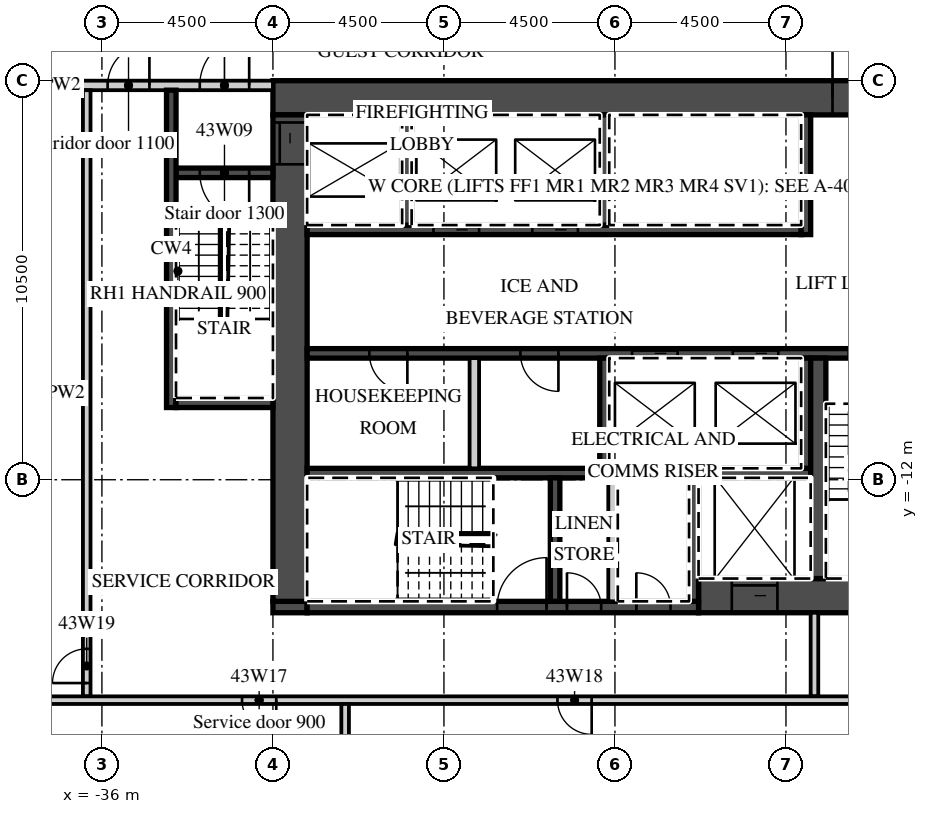
"""IFC4 building model, lengths in metres.
Left out: names, types, materials, properties, quantities, classifications, styles, units other than length and angle.
Written with IfcOpenShell. Run it as: python <this file> out.ifc"""

import sys

from ifc_helpers import new_model, si_unit, direction, frame, frame_2d, origin, place, context, subcontext, project, spatial, rectangle, extrude, element, fill, save


model = new_model("IFC4")
c1 = context("Model", 3, precision=1e-05, world=origin(), true_north=direction((0.0, 1.0)))
c2 = subcontext(c1, "Body", "Model", "MODEL_VIEW")
j1 = project(units=[si_unit("LENGTHUNIT", "METRE"), si_unit("PLANEANGLEUNIT", "RADIAN")], contexts=[c1])
p1 = place(None, origin())
s1 = spatial("IfcSite", under=j1, at=p1, CompositionType="ELEMENT")
p2 = place(p1, origin())
s2 = spatial("IfcBuilding", under=s1, at=p2, CompositionType="ELEMENT")
p3 = place(p2, frame((0.0, 0.0, 183.4)))
s3 = spatial("IfcBuildingStorey", under=s2, at=p3, CompositionType="ELEMENT", Elevation=183.4)
p4 = place(p3, frame((-31.5, -1.95, 0.0), z_axis=(0.0, 0.0, 1.0), x_axis=(1.0, 0.0, 0.0)))
e1 = element("IfcWall", 1, at=p4, inside=s3, PredefinedType="SHEAR", context=c2, shape_type="SweptSolid", body=[
    extrude(rectangle(XDim=18.0, YDim=0.9, at=frame_2d((9.0, 0.0))), origin(), (0.0, 0.0, 1.0), 3.02),
])
p5 = place(p4, frame((14.725, 0.0, 0.0)))
e2 = element("IfcOpeningElement", 2, at=p5, cuts=e1, PredefinedType="OPENING", context=c2, shape_type="SweptSolid", body=[
    extrude(rectangle(XDim=1.8, YDim=2.1, at=frame_2d((0.9, 1.05))), frame((0.0, 0.46, 0.0), z_axis=(0.0, -1.0, 0.0), x_axis=(1.0, 0.0, 0.0)), (0.0, 0.0, 1.0), 0.92),
])
p6 = place(p3, frame((-20.3, -15.05, 0.0), z_axis=(0.0, 0.0, 1.0), x_axis=(1.0, 0.0, 0.0)))
e3 = element("IfcWall", 3, at=p6, inside=s3, PredefinedType="SHEAR", context=c2, shape_type="SweptSolid", body=[
    extrude(rectangle(XDim=6.8, YDim=0.9, at=frame_2d((3.4, 0.0))), origin(), (0.0, 0.0, 1.0), 3.02),
])
p7 = place(p6, frame((0.875, 0.0, 0.0)))
e4 = element("IfcOpeningElement", 4, at=p7, cuts=e3, PredefinedType="OPENING", context=c2, shape_type="SweptSolid", body=[
    extrude(rectangle(XDim=1.2, YDim=2.1, at=frame_2d((0.6, 1.05))), frame((0.0, 0.46, 0.0), z_axis=(0.0, -1.0, 0.0), x_axis=(1.0, 0.0, 0.0)), (0.0, 0.0, 1.0), 0.92),
])
p8 = place(p3, frame((-31.5, -15.35, 0.0), z_axis=(0.0, 0.0, 1.0), x_axis=(1.0, 0.0, 0.0)))
e5 = element("IfcWall", 5, at=p8, inside=s3, PredefinedType="SHEAR", context=c2, shape_type="SweptSolid", body=[
    extrude(rectangle(XDim=0.9, YDim=0.3, at=frame_2d((0.45, 0.0))), origin(), (0.0, 0.0, 1.0), 3.02),
])
p9 = place(p3, frame((-30.6, -15.35, 0.0), z_axis=(0.0, 0.0, 1.0), x_axis=(1.0, 0.0, 0.0)))
e6 = element("IfcWall", 6, at=p9, inside=s3, PredefinedType="SHEAR", context=c2, shape_type="SweptSolid", body=[
    extrude(rectangle(XDim=10.3, YDim=0.3, at=frame_2d((5.15, 0.0))), origin(), (0.0, 0.0, 1.0), 3.02),
])
p10 = place(p9, frame((5.0, 0.0, 0.0)))
e7 = element("IfcOpeningElement", 7, at=p10, cuts=e6, PredefinedType="OPENING", context=c2, shape_type="SweptSolid", body=[
    extrude(rectangle(XDim=1.3, YDim=2.1, at=frame_2d((0.65, 1.05))), frame((0.0, 0.16, 0.0), z_axis=(0.0, -1.0, 0.0), x_axis=(1.0, 0.0, 0.0)), (0.0, 0.0, 1.0), 0.32),
])
p11 = place(p9, frame((6.837, 0.0, 0.0)))
e8 = element("IfcOpeningElement", 8, at=p11, cuts=e6, PredefinedType="OPENING", context=c2, shape_type="SweptSolid", body=[
    extrude(rectangle(XDim=0.9, YDim=2.1, at=frame_2d((0.45, 1.05))), frame((0.0, 0.16, 0.0), z_axis=(0.0, -1.0, 0.0), x_axis=(1.0, 0.0, 0.0)), (0.0, 0.0, 1.0), 0.32),
])
p12 = place(p9, frame((8.663, 0.0, 0.0)))
e9 = element("IfcOpeningElement", 9, at=p12, cuts=e6, PredefinedType="OPENING", context=c2, shape_type="SweptSolid", body=[
    extrude(rectangle(XDim=0.9, YDim=2.1, at=frame_2d((0.45, 1.05))), frame((0.0, 0.16, 0.0), z_axis=(0.0, -1.0, 0.0), x_axis=(1.0, 0.0, 0.0)), (0.0, 0.0, 1.0), 0.32),
])
p13 = place(p3, frame((-31.05, -15.2, 0.0), z_axis=(0.0, 0.0, 1.0), x_axis=(0.0, 1.0, 0.0)))
e10 = element("IfcWall", 10, at=p13, inside=s3, PredefinedType="SHEAR", context=c2, shape_type="SweptSolid", body=[
    extrude(rectangle(XDim=12.8, YDim=0.9, at=frame_2d((6.4, 0.0))), origin(), (0.0, 0.0, 1.0), 3.02),
])
p14 = place(p13, frame((11.5, 0.0, 0.0)))
e11 = element("IfcOpeningElement", 11, at=p14, cuts=e10, PredefinedType="OPENING", context=c2, shape_type="SweptSolid", body=[
    extrude(rectangle(XDim=1.1, YDim=2.1, at=frame_2d((0.55, 1.05))), frame((0.0, 0.46, 0.0), z_axis=(0.0, -1.0, 0.0), x_axis=(1.0, 0.0, 0.0)), (0.0, 0.0, 1.0), 0.92),
])
p15 = place(p3, frame((-30.6, -5.425, 0.0), z_axis=(0.0, 0.0, 1.0), x_axis=(1.0, 0.0, 0.0)))
e12 = element("IfcWall", 12, at=p15, inside=s3, PredefinedType="SHEAR", context=c2, shape_type="SweptSolid", body=[
    extrude(rectangle(XDim=13.0, YDim=0.25, at=frame_2d((6.5, 0.0))), origin(), (0.0, 0.0, 1.0), 3.02),
])
p16 = place(p15, frame((3.325, 0.0, 0.0)))
e13 = element("IfcOpeningElement", 13, at=p16, cuts=e12, PredefinedType="OPENING", context=c2, shape_type="SweptSolid", body=[
    extrude(rectangle(XDim=1.2, YDim=2.1, at=frame_2d((0.6, 1.05))), frame((0.0, 0.135, 0.0), z_axis=(0.0, -1.0, 0.0), x_axis=(1.0, 0.0, 0.0)), (0.0, 0.0, 1.0), 0.27),
])
p17 = place(p15, frame((5.925, 0.0, 0.0)))
e14 = element("IfcOpeningElement", 14, at=p17, cuts=e12, PredefinedType="OPENING", context=c2, shape_type="SweptSolid", body=[
    extrude(rectangle(XDim=1.2, YDim=2.1, at=frame_2d((0.6, 1.05))), frame((0.0, 0.135, 0.0), z_axis=(0.0, -1.0, 0.0), x_axis=(1.0, 0.0, 0.0)), (0.0, 0.0, 1.0), 0.27),
])
p18 = place(p3, frame((-17.475, -5.55, 0.0), z_axis=(0.0, 0.0, 1.0), x_axis=(0.0, 1.0, 0.0)))
e15 = element("IfcWall", 15, at=p18, inside=s3, PredefinedType="SHEAR", context=c2, shape_type="SweptSolid", body=[
    extrude(rectangle(XDim=3.15, YDim=0.25, at=frame_2d((1.575, 0.0))), origin(), (0.0, 0.0, 1.0), 3.02),
])
for number, where, z_axis, x_axis in (
    (16, (-27.975, -5.3, 0.0), (0.0, 0.0, 1.0), (0.0, 1.0, 0.0)),
    (17, (-22.775, -5.3, 0.0), (0.0, 0.0, 1.0), (0.0, 1.0, 0.0)),
):
    element("IfcWall", number, at=place(p3, frame(where, z_axis=z_axis, x_axis=x_axis)), inside=s3, PredefinedType="SHEAR", context=c2, shape_type="SweptSolid", body=[
        extrude(rectangle(XDim=2.9, YDim=0.25, at=frame_2d((1.45, 0.0))), origin(), (0.0, 0.0, 1.0), 3.02),
    ])
p19 = place(p3, frame((-30.6, -8.675, 0.0), z_axis=(0.0, 0.0, 1.0), x_axis=(1.0, 0.0, 0.0)))
e18 = element("IfcWall", 18, at=p19, inside=s3, PredefinedType="SHEAR", context=c2, shape_type="SweptSolid", body=[
    extrude(rectangle(XDim=16.2, YDim=0.25, at=frame_2d((8.1, 0.0))), origin(), (0.0, 0.0, 1.0), 3.02),
])
p20 = place(p19, frame((8.55, 0.0, 0.0)))
e19 = element("IfcOpeningElement", 19, at=p20, cuts=e18, PredefinedType="OPENING", context=c2, shape_type="SweptSolid", body=[
    extrude(rectangle(XDim=1.2, YDim=2.1, at=frame_2d((0.6, 1.05))), frame((0.0, 0.135, 0.0), z_axis=(0.0, -1.0, 0.0), x_axis=(1.0, 0.0, 0.0)), (0.0, 0.0, 1.0), 0.27),
])
p21 = place(p19, frame((11.2, 0.0, 0.0)))
e20 = element("IfcOpeningElement", 20, at=p21, cuts=e18, PredefinedType="OPENING", context=c2, shape_type="SweptSolid", body=[
    extrude(rectangle(XDim=1.2, YDim=2.1, at=frame_2d((0.6, 1.05))), frame((0.0, 0.135, 0.0), z_axis=(0.0, -1.0, 0.0), x_axis=(1.0, 0.0, 0.0)), (0.0, 0.0, 1.0), 0.27),
])
p22 = place(p19, frame((14.25, 0.0, 0.0)))
e21 = element("IfcOpeningElement", 21, at=p22, cuts=e18, PredefinedType="OPENING", context=c2, shape_type="SweptSolid", body=[
    extrude(rectangle(XDim=1.3, YDim=2.1, at=frame_2d((0.65, 1.05))), frame((0.0, 0.135, 0.0), z_axis=(0.0, -1.0, 0.0), x_axis=(1.0, 0.0, 0.0)), (0.0, 0.0, 1.0), 0.27),
])
p23 = place(p19, frame((1.637, 0.0, 0.0)))
e22 = element("IfcOpeningElement", 22, at=p23, cuts=e18, PredefinedType="OPENING", context=c2, shape_type="SweptSolid", body=[
    extrude(rectangle(XDim=1.0, YDim=2.1, at=frame_2d((0.5, 1.05))), frame((0.0, 0.135, 0.0), z_axis=(0.0, -1.0, 0.0), x_axis=(1.0, 0.0, 0.0)), (0.0, 0.0, 1.0), 0.27),
])
p24 = place(p19, frame((5.613, 0.0, 0.0)))
e23 = element("IfcOpeningElement", 23, at=p24, cuts=e18, PredefinedType="OPENING", context=c2, shape_type="SweptSolid", body=[
    extrude(rectangle(XDim=1.0, YDim=2.1, at=frame_2d((0.5, 1.05))), frame((0.0, 0.135, 0.0), z_axis=(0.0, -1.0, 0.0), x_axis=(1.0, 0.0, 0.0)), (0.0, 0.0, 1.0), 0.27),
])
p25 = place(p3, frame((-30.6, -11.825, 0.0), z_axis=(0.0, 0.0, 1.0), x_axis=(1.0, 0.0, 0.0)))
e24 = element("IfcWall", 24, at=p25, inside=s3, PredefinedType="SHEAR", context=c2, shape_type="SweptSolid", body=[
    extrude(rectangle(XDim=13.25, YDim=0.25, at=frame_2d((6.625, 0.0))), origin(), (0.0, 0.0, 1.0), 3.02),
])
for number, where, z_axis, x_axis in (
    (25, (-17.475, -11.7, 0.0), (0.0, 0.0, 1.0), (0.0, 1.0, 0.0)),
    (26, (-22.775, -11.7, 0.0), (0.0, 0.0, 1.0), (0.0, 1.0, 0.0)),
):
    element("IfcWall", number, at=place(p3, frame(where, z_axis=z_axis, x_axis=x_axis)), inside=s3, PredefinedType="SHEAR", context=c2, shape_type="SweptSolid", body=[
        extrude(rectangle(XDim=2.9, YDim=0.25, at=frame_2d((1.45, 0.0))), origin(), (0.0, 0.0, 1.0), 3.02),
    ])
p26 = place(p3, frame((-26.2, -11.7, 0.0), z_axis=(0.0, 0.0, 1.0), x_axis=(0.0, 1.0, 0.0)))
e27 = element("IfcWall", 27, at=p26, inside=s3, PredefinedType="PARTITIONING", context=c2, shape_type="SweptSolid", body=[
    extrude(rectangle(XDim=2.9, YDim=0.25, at=frame_2d((1.45, 0.0))), origin(), (0.0, 0.0, 1.0), 3.02),
])
p27 = place(p3, frame((-17.15, -14.6, 0.0), z_axis=(0.0, 0.0, 1.0), x_axis=(0.0, 1.0, 0.0)))
e28 = element("IfcWall", 28, at=p27, inside=s3, PredefinedType="SHEAR", context=c2, shape_type="SweptSolid", body=[
    extrude(rectangle(XDim=5.8, YDim=0.4, at=frame_2d((2.9, 0.0))), origin(), (0.0, 0.0, 1.0), 3.02),
])
for number, where, z_axis, x_axis in (
    (29, (-20.425, -15.2, 0.0), (0.0, 0.0, 1.0), (0.0, 1.0, 0.0)),
    (30, (-24.075, -15.2, 0.0), (0.0, 0.0, 1.0), (0.0, 1.0, 0.0)),
):
    element("IfcWall", number, at=place(p3, frame(where, z_axis=z_axis, x_axis=x_axis)), inside=s3, PredefinedType="SHEAR", context=c2, shape_type="SweptSolid", body=[
        extrude(rectangle(XDim=3.25, YDim=0.25, at=frame_2d((1.625, 0.0))), origin(), (0.0, 0.0, 1.0), 3.02),
    ])
p28 = place(p3, frame((-22.55, -15.2, 0.0), z_axis=(0.0, 0.0, 1.0), x_axis=(0.0, 1.0, 0.0)))
e31 = element("IfcWall", 31, at=p28, inside=s3, PredefinedType="PARTITIONING", context=c2, shape_type="SweptSolid", body=[
    extrude(rectangle(XDim=3.25, YDim=0.25, at=frame_2d((1.625, 0.0))), origin(), (0.0, 0.0, 1.0), 3.02),
])
p29 = place(p3, frame((-42.632, -1.625, 0.0), z_axis=(0.0, 0.0, 1.0), x_axis=(1.0, 0.0, 0.0)))
e32 = element("IfcWall", 32, at=p29, inside=s3, PredefinedType="PARTITIONING", context=c2, shape_type="SweptSolid", body=[
    extrude(rectangle(XDim=11.132, YDim=0.25, at=frame_2d((5.566, 0.0))), origin(), (0.0, 0.0, 1.0), 3.02),
])
p30 = place(p29, frame((9.207, 0.0, 0.0)))
e33 = element("IfcOpeningElement", 33, at=p30, cuts=e32, PredefinedType="OPENING", context=c2, shape_type="SweptSolid", body=[
    extrude(rectangle(XDim=1.3, YDim=2.1, at=frame_2d((0.65, 1.05))), frame((0.0, 0.135, 0.0), z_axis=(0.0, -1.0, 0.0), x_axis=(1.0, 0.0, 0.0)), (0.0, 0.0, 1.0), 0.27),
])
p31 = place(p29, frame((6.781, 0.0, 0.0)))
e34 = element("IfcOpeningElement", 34, at=p31, cuts=e32, PredefinedType="OPENING", context=c2, shape_type="SweptSolid", body=[
    extrude(rectangle(XDim=1.1, YDim=2.1, at=frame_2d((0.55, 1.05))), frame((0.0, 0.135, 0.0), z_axis=(0.0, -1.0, 0.0), x_axis=(1.0, 0.0, 0.0)), (0.0, 0.0, 1.0), 0.27),
])
p32 = place(p3, frame((-34.05, -3.925, 0.0), z_axis=(0.0, 0.0, 1.0), x_axis=(1.0, 0.0, 0.0)))
e35 = element("IfcWall", 35, at=p32, inside=s3, PredefinedType="SHEAR", context=c2, shape_type="SweptSolid", body=[
    extrude(rectangle(XDim=2.55, YDim=0.25, at=frame_2d((1.275, 0.0))), origin(), (0.0, 0.0, 1.0), 3.02),
])
p33 = place(p32, frame((0.625, 0.0, 0.0)))
e36 = element("IfcOpeningElement", 36, at=p33, cuts=e35, PredefinedType="OPENING", context=c2, shape_type="SweptSolid", body=[
    extrude(rectangle(XDim=1.3, YDim=2.1, at=frame_2d((0.65, 1.05))), frame((0.0, 0.135, 0.0), z_axis=(0.0, -1.0, 0.0), x_axis=(1.0, 0.0, 0.0)), (0.0, 0.0, 1.0), 0.27),
])
p34 = place(p3, frame((-34.175, -10.1, 0.0), z_axis=(0.0, 0.0, 1.0), x_axis=(0.0, 1.0, 0.0)))
e37 = element("IfcWall", 37, at=p34, inside=s3, PredefinedType="SHEAR", context=c2, shape_type="SweptSolid", body=[
    extrude(rectangle(XDim=8.35, YDim=0.25, at=frame_2d((4.175, 0.0))), origin(), (0.0, 0.0, 1.0), 3.02),
])
p35 = place(p3, frame((-34.05, -9.975, 0.0), z_axis=(0.0, 0.0, 1.0), x_axis=(1.0, 0.0, 0.0)))
e38 = element("IfcWall", 38, at=p35, inside=s3, PredefinedType="SHEAR", context=c2, shape_type="SweptSolid", body=[
    extrude(rectangle(XDim=2.55, YDim=0.25, at=frame_2d((1.275, 0.0))), origin(), (0.0, 0.0, 1.0), 3.02),
])
p36 = place(p3, frame((-17.25, -17.7, 0.0), z_axis=(0.0, 0.0, 1.0), x_axis=(0.0, 1.0, 0.0)))
e39 = element("IfcWall", 39, at=p36, inside=s3, PredefinedType="PARTITIONING", context=c2, shape_type="SweptSolid", body=[
    extrude(rectangle(XDim=2.2, YDim=0.2, at=frame_2d((1.1, 0.0))), origin(), (0.0, 0.0, 1.0), 3.02),
])
p37 = place(p3, frame((-36.4, -17.7, 0.0), z_axis=(0.0, 0.0, 1.0), x_axis=(0.0, 1.0, 0.0)))
e40 = element("IfcWall", 40, at=p37, inside=s3, PredefinedType="PARTITIONING", context=c2, shape_type="SweptSolid", body=[
    extrude(rectangle(XDim=15.95, YDim=0.2, at=frame_2d((7.975, 0.0))), origin(), (0.0, 0.0, 1.0), 3.02),
])
p38 = place(p37, frame((0.35, 0.0, 0.0)))
e41 = element("IfcOpeningElement", 41, at=p38, cuts=e40, PredefinedType="OPENING", context=c2, shape_type="SweptSolid", body=[
    extrude(rectangle(XDim=0.9, YDim=2.1, at=frame_2d((0.45, 1.05))), frame((0.0, 0.11, 0.0), z_axis=(0.0, -1.0, 0.0), x_axis=(1.0, 0.0, 0.0)), (0.0, 0.0, 1.0), 0.22),
])
p39 = place(p3, frame((-41.074, -17.8, 0.0), z_axis=(0.0, 0.0, 1.0), x_axis=(1.0, 0.0, 0.0)))
e42 = element("IfcWall", 42, at=p39, inside=s3, PredefinedType="PARTITIONING", context=c2, shape_type="SweptSolid", body=[
    extrude(rectangle(XDim=27.474, YDim=0.2, at=frame_2d((13.737, 0.0))), origin(), (0.0, 0.0, 1.0), 3.02),
])
p40 = place(p39, frame((8.762, 0.0, 0.0)))
e43 = element("IfcOpeningElement", 43, at=p40, cuts=e42, PredefinedType="OPENING", context=c2, shape_type="SweptSolid", body=[
    extrude(rectangle(XDim=0.9, YDim=2.1, at=frame_2d((0.45, 1.05))), frame((0.0, 0.11, 0.0), z_axis=(0.0, -1.0, 0.0), x_axis=(1.0, 0.0, 0.0)), (0.0, 0.0, 1.0), 0.22),
])
p41 = place(p39, frame((17.062, 0.0, 0.0)))
e44 = element("IfcOpeningElement", 44, at=p41, cuts=e42, PredefinedType="OPENING", context=c2, shape_type="SweptSolid", body=[
    extrude(rectangle(XDim=0.9, YDim=2.1, at=frame_2d((0.45, 1.05))), frame((0.0, 0.11, 0.0), z_axis=(0.0, -1.0, 0.0), x_axis=(1.0, 0.0, 0.0)), (0.0, 0.0, 1.0), 0.22),
])
p42 = place(p3, frame((-29.6, -23.852, 0.0), z_axis=(0.0, 0.0, 1.0), x_axis=(0.0, 1.0, 0.0)))
e45 = element("IfcWall", 45, at=p42, inside=s3, PredefinedType="PARTITIONING", context=c2, shape_type="SweptSolid", body=[
    extrude(rectangle(XDim=5.952, YDim=0.2, at=frame_2d((2.976, 0.0))), origin(), (0.0, 0.0, 1.0), 3.02),
])
p43 = place(p20, origin())
e46 = element("IfcDoor", 46, at=p43, inside=s3, OperationType="SLIDING_TO_LEFT", PredefinedType="DOOR", context=c2, shape_type="SweptSolid", body=[
    extrude(rectangle(XDim=1.2, YDim=2.1, at=frame_2d((0.6, 1.05))), frame((0.0, 0.025, 0.0), z_axis=(0.0, -1.0, 0.0), x_axis=(1.0, 0.0, 0.0)), (0.0, 0.0, 1.0), 0.05),
])
fill(e19, e46)
p44 = place(p21, origin())
e47 = element("IfcDoor", 47, at=p44, inside=s3, OperationType="SLIDING_TO_RIGHT", PredefinedType="DOOR", context=c2, shape_type="SweptSolid", body=[
    extrude(rectangle(XDim=1.2, YDim=2.1, at=frame_2d((0.6, 1.05))), frame((0.0, 0.025, 0.0), z_axis=(0.0, -1.0, 0.0), x_axis=(1.0, 0.0, 0.0)), (0.0, 0.0, 1.0), 0.05),
])
fill(e20, e47)
p45 = place(p16, origin())
e48 = element("IfcDoor", 48, at=p45, inside=s3, OperationType="SLIDING_TO_RIGHT", PredefinedType="DOOR", context=c2, shape_type="SweptSolid", body=[
    extrude(rectangle(XDim=1.2, YDim=2.1, at=frame_2d((0.6, 1.05))), frame((0.0, 0.025, 0.0), z_axis=(0.0, -1.0, 0.0), x_axis=(1.0, 0.0, 0.0)), (0.0, 0.0, 1.0), 0.05),
])
fill(e13, e48)
p46 = place(p17, origin())
e49 = element("IfcDoor", 49, at=p46, inside=s3, OperationType="SLIDING_TO_RIGHT", PredefinedType="DOOR", context=c2, shape_type="SweptSolid", body=[
    extrude(rectangle(XDim=1.2, YDim=2.1, at=frame_2d((0.6, 1.05))), frame((0.0, 0.025, 0.0), z_axis=(0.0, -1.0, 0.0), x_axis=(1.0, 0.0, 0.0)), (0.0, 0.0, 1.0), 0.05),
])
fill(e14, e49)
p47 = place(p7, origin())
e50 = element("IfcDoor", 50, at=p47, inside=s3, OperationType="SLIDING_TO_LEFT", PredefinedType="DOOR", context=c2, shape_type="SweptSolid", body=[
    extrude(rectangle(XDim=1.2, YDim=2.1, at=frame_2d((0.6, 1.05))), frame((0.0, 0.025, 0.0), z_axis=(0.0, -1.0, 0.0), x_axis=(1.0, 0.0, 0.0)), (0.0, 0.0, 1.0), 0.05),
])
fill(e4, e50)
p48 = place(p14, origin())
e51 = element("IfcDoor", 51, at=p48, inside=s3, OperationType="SLIDING_TO_RIGHT", PredefinedType="DOOR", context=c2, shape_type="SweptSolid", body=[
    extrude(rectangle(XDim=1.1, YDim=2.1, at=frame_2d((0.55, 1.05))), frame((0.0, 0.025, 0.0), z_axis=(0.0, -1.0, 0.0), x_axis=(1.0, 0.0, 0.0)), (0.0, 0.0, 1.0), 0.05),
])
fill(e11, e51)
p49 = place(p5, origin())
e52 = element("IfcDoor", 52, at=p49, inside=s3, OperationType="DOUBLE_DOOR_DOUBLE_SWING", PredefinedType="DOOR", context=c2, shape_type="SweptSolid", body=[
    extrude(rectangle(XDim=1.8, YDim=2.1, at=frame_2d((0.9, 1.05))), frame((0.0, 0.025, 0.0), z_axis=(0.0, -1.0, 0.0), x_axis=(1.0, 0.0, 0.0)), (0.0, 0.0, 1.0), 0.05),
])
fill(e2, e52)
p50 = place(p30, origin())
e53 = element("IfcDoor", 53, at=p50, inside=s3, OperationType="SINGLE_SWING_RIGHT", PredefinedType="DOOR", context=c2, shape_type="SweptSolid", body=[
    extrude(rectangle(XDim=1.3, YDim=2.1, at=frame_2d((0.65, 1.05))), frame((0.0, 0.025, 0.0), z_axis=(0.0, -1.0, 0.0), x_axis=(1.0, 0.0, 0.0)), (0.0, 0.0, 1.0), 0.05),
])
fill(e33, e53)
p51 = place(p33, origin())
e54 = element("IfcDoor", 54, at=p51, inside=s3, OperationType="SINGLE_SWING_RIGHT", PredefinedType="DOOR", context=c2, shape_type="SweptSolid", body=[
    extrude(rectangle(XDim=1.3, YDim=2.1, at=frame_2d((0.65, 1.05))), frame((0.0, 0.025, 0.0), z_axis=(0.0, -1.0, 0.0), x_axis=(1.0, 0.0, 0.0)), (0.0, 0.0, 1.0), 0.05),
])
fill(e36, e54)
p52 = place(p31, origin())
e55 = element("IfcDoor", 55, at=p52, inside=s3, OperationType="SINGLE_SWING_RIGHT", PredefinedType="DOOR", context=c2, shape_type="SweptSolid", body=[
    extrude(rectangle(XDim=1.1, YDim=2.1, at=frame_2d((0.55, 1.05))), frame((0.0, 0.025, 0.0), z_axis=(0.0, -1.0, 0.0), x_axis=(1.0, 0.0, 0.0)), (0.0, 0.0, 1.0), 0.05),
])
fill(e34, e55)
p53 = place(p22, origin())
e56 = element("IfcDoor", 56, at=p53, inside=s3, OperationType="SINGLE_SWING_RIGHT", PredefinedType="DOOR", context=c2, shape_type="SweptSolid", body=[
    extrude(rectangle(XDim=1.3, YDim=2.1, at=frame_2d((0.65, 1.05))), frame((0.0, 0.025, 0.0), z_axis=(0.0, -1.0, 0.0), x_axis=(1.0, 0.0, 0.0)), (0.0, 0.0, 1.0), 0.05),
])
fill(e21, e56)
p54 = place(p10, origin())
e57 = element("IfcDoor", 57, at=p54, inside=s3, OperationType="SINGLE_SWING_RIGHT", PredefinedType="DOOR", context=c2, shape_type="SweptSolid", body=[
    extrude(rectangle(XDim=1.3, YDim=2.1, at=frame_2d((0.65, 1.05))), frame((0.0, 0.025, 0.0), z_axis=(0.0, -1.0, 0.0), x_axis=(1.0, 0.0, 0.0)), (0.0, 0.0, 1.0), 0.05),
])
fill(e7, e57)
p55 = place(p11, origin())
e58 = element("IfcDoor", 58, at=p55, inside=s3, OperationType="SINGLE_SWING_LEFT", PredefinedType="DOOR", context=c2, shape_type="SweptSolid", body=[
    extrude(rectangle(XDim=0.9, YDim=2.1, at=frame_2d((0.45, 1.05))), frame((0.0, 0.025, 0.0), z_axis=(0.0, -1.0, 0.0), x_axis=(1.0, 0.0, 0.0)), (0.0, 0.0, 1.0), 0.05),
])
fill(e8, e58)
p56 = place(p12, origin())
e59 = element("IfcDoor", 59, at=p56, inside=s3, OperationType="SINGLE_SWING_LEFT", PredefinedType="DOOR", context=c2, shape_type="SweptSolid", body=[
    extrude(rectangle(XDim=0.9, YDim=2.1, at=frame_2d((0.45, 1.05))), frame((0.0, 0.025, 0.0), z_axis=(0.0, -1.0, 0.0), x_axis=(1.0, 0.0, 0.0)), (0.0, 0.0, 1.0), 0.05),
])
fill(e9, e59)
p57 = place(p23, origin())
e60 = element("IfcDoor", 60, at=p57, inside=s3, OperationType="SINGLE_SWING_RIGHT", PredefinedType="DOOR", context=c2, shape_type="SweptSolid", body=[
    extrude(rectangle(XDim=1.0, YDim=2.1, at=frame_2d((0.5, 1.05))), frame((0.0, 0.025, 0.0), z_axis=(0.0, -1.0, 0.0), x_axis=(1.0, 0.0, 0.0)), (0.0, 0.0, 1.0), 0.05),
])
fill(e22, e60)
p58 = place(p24, origin())
e61 = element("IfcDoor", 61, at=p58, inside=s3, OperationType="SINGLE_SWING_RIGHT", PredefinedType="DOOR", context=c2, shape_type="SweptSolid", body=[
    extrude(rectangle(XDim=1.0, YDim=2.1, at=frame_2d((0.5, 1.05))), frame((0.0, 0.025, 0.0), z_axis=(0.0, -1.0, 0.0), x_axis=(1.0, 0.0, 0.0)), (0.0, 0.0, 1.0), 0.05),
])
fill(e23, e61)
p59 = place(p40, origin())
e62 = element("IfcDoor", 62, at=p59, inside=s3, OperationType="SINGLE_SWING_RIGHT", PredefinedType="DOOR", context=c2, shape_type="SweptSolid", body=[
    extrude(rectangle(XDim=0.9, YDim=2.1, at=frame_2d((0.45, 1.05))), frame((0.0, 0.025, 0.0), z_axis=(0.0, -1.0, 0.0), x_axis=(1.0, 0.0, 0.0)), (0.0, 0.0, 1.0), 0.05),
])
fill(e43, e62)
p60 = place(p41, origin())
e63 = element("IfcDoor", 63, at=p60, inside=s3, OperationType="SINGLE_SWING_RIGHT", PredefinedType="DOOR", context=c2, shape_type="SweptSolid", body=[
    extrude(rectangle(XDim=0.9, YDim=2.1, at=frame_2d((0.45, 1.05))), frame((0.0, 0.025, 0.0), z_axis=(0.0, -1.0, 0.0), x_axis=(1.0, 0.0, 0.0)), (0.0, 0.0, 1.0), 0.05),
])
fill(e44, e63)
p61 = place(p38, origin())
e64 = element("IfcDoor", 64, at=p61, inside=s3, OperationType="SINGLE_SWING_LEFT", PredefinedType="DOOR", context=c2, shape_type="SweptSolid", body=[
    extrude(rectangle(XDim=0.9, YDim=2.1, at=frame_2d((0.45, 1.05))), frame((0.0, 0.025, 0.0), z_axis=(0.0, -1.0, 0.0), x_axis=(1.0, 0.0, 0.0)), (0.0, 0.0, 1.0), 0.05),
])
fill(e41, e64)
save(model, sys.argv[1])
